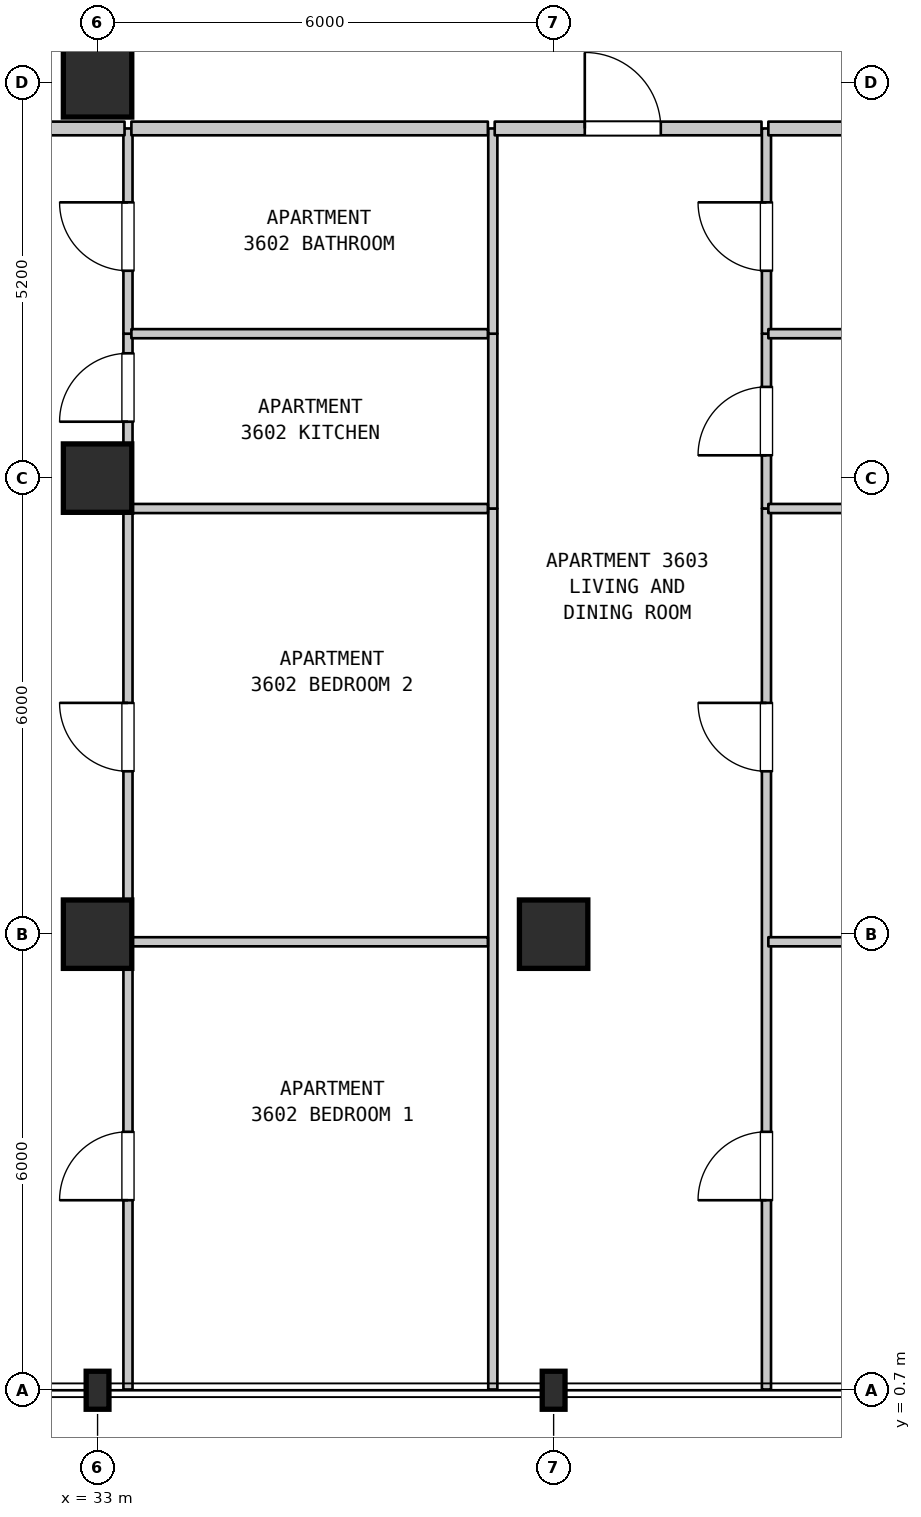
"""IFC4 building model, lengths in metres.
Left out: names, types, materials, properties, quantities, classifications, styles, units other than length and angle.
Written with IfcOpenShell. Run it as: python <this file> out.ifc"""

import sys

from ifc_helpers import new_model, si_unit, direction, frame, frame_2d, origin, origin_2d, place, context, subcontext, project, spatial, rectangle, i_section, extrude, element, fill, save


model = new_model("IFC4")
c1 = context("Model", 3, precision=1e-05, world=origin(), true_north=direction((0.0, 1.0)))
c2 = subcontext(c1, "Body", "Model", "MODEL_VIEW")
j1 = project(units=[si_unit("LENGTHUNIT", "METRE"), si_unit("PLANEANGLEUNIT", "RADIAN")], contexts=[c1])
p1 = place(None, origin())
s1 = spatial("IfcSite", under=j1, at=p1, CompositionType="ELEMENT")
p2 = place(p1, origin())
s2 = spatial("IfcBuilding", under=s1, at=p2, CompositionType="ELEMENT")
p3 = place(p2, frame((0.0, 0.0, 148.3)))
s3 = spatial("IfcBuildingStorey", under=s2, at=p3, CompositionType="ELEMENT", Elevation=148.3)
p4 = place(p3, frame((33.0, 0.7, 0.0), z_axis=(0.0, 0.0, 1.0), x_axis=(1.0, 0.0, 0.0)))
e1 = element("IfcColumn", 1, at=p4, inside=s3, PredefinedType="COLUMN", context=c2, shape_type="SweptSolid", body=[
    extrude(i_section(OverallWidth=0.3, OverallDepth=0.5, WebThickness=0.014, FlangeThickness=0.028, FilletRadius=0.027, at=origin_2d()), origin(), (0.0, 0.0, 1.0), 3.7),
])
for number, where, z_axis, x_axis in (
    (2, (33.0, 6.7, 0.0), (0.0, 0.0, 1.0), (1.0, 0.0, 0.0)),
    (3, (33.0, 12.7, 0.0), (0.0, 0.0, 1.0), (1.0, 0.0, 0.0)),
    (4, (33.0, 17.9, 0.0), (0.0, 0.0, 1.0), (1.0, 0.0, 0.0)),
):
    element("IfcColumn", number, at=place(p3, frame(where, z_axis=z_axis, x_axis=x_axis)), inside=s3, PredefinedType="COLUMN", context=c2, shape_type="SweptSolid", body=[
        extrude(rectangle(XDim=0.9, YDim=0.9, at=origin_2d()), origin(), (0.0, 0.0, 1.0), 3.7),
    ])
p5 = place(p3, frame((39.0, 0.7, 0.0), z_axis=(0.0, 0.0, 1.0), x_axis=(1.0, 0.0, 0.0)))
e5 = element("IfcColumn", 5, at=p5, inside=s3, PredefinedType="COLUMN", context=c2, shape_type="SweptSolid", body=[
    extrude(i_section(OverallWidth=0.3, OverallDepth=0.5, WebThickness=0.014, FlangeThickness=0.028, FilletRadius=0.027, at=origin_2d()), origin(), (0.0, 0.0, 1.0), 3.7),
])
p6 = place(p3, frame((39.0, 6.7, 0.0), z_axis=(0.0, 0.0, 1.0), x_axis=(1.0, 0.0, 0.0)))
e6 = element("IfcColumn", 6, at=p6, inside=s3, PredefinedType="COLUMN", context=c2, shape_type="SweptSolid", body=[
    extrude(rectangle(XDim=0.9, YDim=0.9, at=origin_2d()), origin(), (0.0, 0.0, 1.0), 3.7),
])
p7 = place(p3, frame((33.4, 0.71, 0.0), z_axis=(0.0, 0.0, 1.0), x_axis=(0.0, 1.0, 0.0)))
e7 = element("IfcWall", 7, at=p7, inside=s3, PredefinedType="PARTITIONING", context=c2, shape_type="SweptSolid", body=[
    extrude(rectangle(XDim=11.59, YDim=0.12, at=frame_2d((5.795, 0.0))), origin(), (0.0, 0.0, 1.0), 3.385),
])
p8 = place(p7, frame((2.49, 0.0, 0.0)))
e8 = element("IfcOpeningElement", 8, at=p8, cuts=e7, PredefinedType="OPENING", context=c2, shape_type="SweptSolid", body=[
    extrude(rectangle(XDim=0.9, YDim=2.15, at=frame_2d((0.45, 1.075))), frame((0.0, 0.07, 0.0), z_axis=(0.0, -1.0, 0.0), x_axis=(1.0, 0.0, 0.0)), (0.0, 0.0, 1.0), 0.14),
])
p9 = place(p7, frame((8.133, 0.0, 0.0)))
e9 = element("IfcOpeningElement", 9, at=p9, cuts=e7, PredefinedType="OPENING", context=c2, shape_type="SweptSolid", body=[
    extrude(rectangle(XDim=0.9, YDim=2.15, at=frame_2d((0.45, 1.075))), frame((0.0, 0.07, 0.0), z_axis=(0.0, -1.0, 0.0), x_axis=(1.0, 0.0, 0.0)), (0.0, 0.0, 1.0), 0.14),
])
p10 = place(p3, frame((33.4, 12.3, 0.0), z_axis=(0.0, 0.0, 1.0), x_axis=(0.0, 1.0, 0.0)))
e10 = element("IfcWall", 10, at=p10, inside=s3, PredefinedType="PARTITIONING", context=c2, shape_type="SweptSolid", body=[
    extrude(rectangle(XDim=2.3, YDim=0.12, at=frame_2d((1.15, 0.0))), origin(), (0.0, 0.0, 1.0), 3.385),
])
p11 = place(p10, frame((1.142, 0.0, 0.0)))
e11 = element("IfcOpeningElement", 11, at=p11, cuts=e10, PredefinedType="OPENING", context=c2, shape_type="SweptSolid", body=[
    extrude(rectangle(XDim=0.9, YDim=2.15, at=frame_2d((0.45, 1.075))), frame((0.0, 0.07, 0.0), z_axis=(0.0, -1.0, 0.0), x_axis=(1.0, 0.0, 0.0)), (0.0, 0.0, 1.0), 0.14),
])
p12 = place(p3, frame((33.4, 14.6, 0.0), z_axis=(0.0, 0.0, 1.0), x_axis=(0.0, 1.0, 0.0)))
e12 = element("IfcWall", 12, at=p12, inside=s3, PredefinedType="PARTITIONING", context=c2, shape_type="SweptSolid", body=[
    extrude(rectangle(XDim=2.7, YDim=0.12, at=frame_2d((1.35, 0.0))), origin(), (0.0, 0.0, 1.0), 3.385),
])
p13 = place(p12, frame((0.828, 0.0, 0.0)))
e13 = element("IfcOpeningElement", 13, at=p13, cuts=e12, PredefinedType="OPENING", context=c2, shape_type="SweptSolid", body=[
    extrude(rectangle(XDim=0.9, YDim=2.1, at=frame_2d((0.45, 1.05))), frame((0.0, 0.07, 0.0), z_axis=(0.0, -1.0, 0.0), x_axis=(1.0, 0.0, 0.0)), (0.0, 0.0, 1.0), 0.14),
])
p14 = place(p3, frame((38.2, 0.71, 0.0), z_axis=(0.0, 0.0, 1.0), x_axis=(0.0, 1.0, 0.0)))
e14 = element("IfcWall", 14, at=p14, inside=s3, PredefinedType="PARTITIONING", context=c2, shape_type="SweptSolid", body=[
    extrude(rectangle(XDim=11.59, YDim=0.12, at=frame_2d((5.795, 0.0))), origin(), (0.0, 0.0, 1.0), 3.385),
])
p15 = place(p3, frame((38.2, 12.3, 0.0), z_axis=(0.0, 0.0, 1.0), x_axis=(0.0, 1.0, 0.0)))
e15 = element("IfcWall", 15, at=p15, inside=s3, PredefinedType="PARTITIONING", context=c2, shape_type="SweptSolid", body=[
    extrude(rectangle(XDim=2.3, YDim=0.12, at=frame_2d((1.15, 0.0))), origin(), (0.0, 0.0, 1.0), 3.385),
])
p16 = place(p3, frame((38.2, 14.6, 0.0), z_axis=(0.0, 0.0, 1.0), x_axis=(0.0, 1.0, 0.0)))
e16 = element("IfcWall", 16, at=p16, inside=s3, PredefinedType="PARTITIONING", context=c2, shape_type="SweptSolid", body=[
    extrude(rectangle(XDim=2.7, YDim=0.12, at=frame_2d((1.35, 0.0))), origin(), (0.0, 0.0, 1.0), 3.385),
])
p17 = place(p3, frame((41.8, 0.71, 0.0), z_axis=(0.0, 0.0, 1.0), x_axis=(0.0, 1.0, 0.0)))
e17 = element("IfcWall", 17, at=p17, inside=s3, PredefinedType="PARTITIONING", context=c2, shape_type="SweptSolid", body=[
    extrude(rectangle(XDim=11.59, YDim=0.12, at=frame_2d((5.795, 0.0))), origin(), (0.0, 0.0, 1.0), 3.385),
])
p18 = place(p17, frame((2.49, 0.0, 0.0)))
e18 = element("IfcOpeningElement", 18, at=p18, cuts=e17, PredefinedType="OPENING", context=c2, shape_type="SweptSolid", body=[
    extrude(rectangle(XDim=0.9, YDim=2.15, at=frame_2d((0.45, 1.075))), frame((0.0, 0.07, 0.0), z_axis=(0.0, -1.0, 0.0), x_axis=(1.0, 0.0, 0.0)), (0.0, 0.0, 1.0), 0.14),
])
p19 = place(p17, frame((8.133, 0.0, 0.0)))
e19 = element("IfcOpeningElement", 19, at=p19, cuts=e17, PredefinedType="OPENING", context=c2, shape_type="SweptSolid", body=[
    extrude(rectangle(XDim=0.9, YDim=2.15, at=frame_2d((0.45, 1.075))), frame((0.0, 0.07, 0.0), z_axis=(0.0, -1.0, 0.0), x_axis=(1.0, 0.0, 0.0)), (0.0, 0.0, 1.0), 0.14),
])
p20 = place(p3, frame((41.8, 12.3, 0.0), z_axis=(0.0, 0.0, 1.0), x_axis=(0.0, 1.0, 0.0)))
e20 = element("IfcWall", 20, at=p20, inside=s3, PredefinedType="PARTITIONING", context=c2, shape_type="SweptSolid", body=[
    extrude(rectangle(XDim=2.3, YDim=0.12, at=frame_2d((1.15, 0.0))), origin(), (0.0, 0.0, 1.0), 3.385),
])
p21 = place(p20, frame((0.7, 0.0, 0.0)))
e21 = element("IfcOpeningElement", 21, at=p21, cuts=e20, PredefinedType="OPENING", context=c2, shape_type="SweptSolid", body=[
    extrude(rectangle(XDim=0.9, YDim=2.15, at=frame_2d((0.45, 1.075))), frame((0.0, 0.07, 0.0), z_axis=(0.0, -1.0, 0.0), x_axis=(1.0, 0.0, 0.0)), (0.0, 0.0, 1.0), 0.14),
])
p22 = place(p3, frame((41.8, 14.6, 0.0), z_axis=(0.0, 0.0, 1.0), x_axis=(0.0, 1.0, 0.0)))
e22 = element("IfcWall", 22, at=p22, inside=s3, PredefinedType="PARTITIONING", context=c2, shape_type="SweptSolid", body=[
    extrude(rectangle(XDim=2.7, YDim=0.12, at=frame_2d((1.35, 0.0))), origin(), (0.0, 0.0, 1.0), 3.385),
])
p23 = place(p22, frame((0.828, 0.0, 0.0)))
e23 = element("IfcOpeningElement", 23, at=p23, cuts=e22, PredefinedType="OPENING", context=c2, shape_type="SweptSolid", body=[
    extrude(rectangle(XDim=0.9, YDim=2.1, at=frame_2d((0.45, 1.05))), frame((0.0, 0.07, 0.0), z_axis=(0.0, -1.0, 0.0), x_axis=(1.0, 0.0, 0.0)), (0.0, 0.0, 1.0), 0.14),
])
p24 = place(p3, frame((33.445, 6.6, 0.0), z_axis=(0.0, 0.0, 1.0), x_axis=(1.0, 0.0, 0.0)))
e24 = element("IfcWall", 24, at=p24, inside=s3, PredefinedType="PARTITIONING", context=c2, shape_type="SweptSolid", body=[
    extrude(rectangle(XDim=4.69, YDim=0.12, at=frame_2d((2.345, 0.0))), origin(), (0.0, 0.0, 1.0), 2.935),
])
p25 = place(p3, frame((41.825, 6.6, 0.0), z_axis=(0.0, 0.0, 1.0), x_axis=(1.0, 0.0, 0.0)))
e25 = element("IfcWall", 25, at=p25, inside=s3, PredefinedType="PARTITIONING", context=c2, shape_type="SweptSolid", body=[
    extrude(rectangle(XDim=4.97, YDim=0.12, at=frame_2d((2.485, 0.0))), origin(), (0.0, 0.0, 1.0), 2.785),
])
p26 = place(p3, frame((33.445, 12.3, 0.0), z_axis=(0.0, 0.0, 1.0), x_axis=(1.0, 0.0, 0.0)))
e26 = element("IfcWall", 26, at=p26, inside=s3, PredefinedType="PARTITIONING", context=c2, shape_type="SweptSolid", body=[
    extrude(rectangle(XDim=4.69, YDim=0.12, at=frame_2d((2.345, 0.0))), origin(), (0.0, 0.0, 1.0), 3.385),
])
p27 = place(p3, frame((41.825, 12.3, 0.0), z_axis=(0.0, 0.0, 1.0), x_axis=(1.0, 0.0, 0.0)))
e27 = element("IfcWall", 27, at=p27, inside=s3, PredefinedType="PARTITIONING", context=c2, shape_type="SweptSolid", body=[
    extrude(rectangle(XDim=4.97, YDim=0.12, at=frame_2d((2.485, 0.0))), origin(), (0.0, 0.0, 1.0), 3.385),
])
p28 = place(p3, frame((33.445, 14.6, 0.0), z_axis=(0.0, 0.0, 1.0), x_axis=(1.0, 0.0, 0.0)))
e28 = element("IfcWall", 28, at=p28, inside=s3, PredefinedType="PARTITIONING", context=c2, shape_type="SweptSolid", body=[
    extrude(rectangle(XDim=4.69, YDim=0.12, at=frame_2d((2.345, 0.0))), origin(), (0.0, 0.0, 1.0), 3.385),
])
p29 = place(p3, frame((41.825, 14.6, 0.0), z_axis=(0.0, 0.0, 1.0), x_axis=(1.0, 0.0, 0.0)))
e29 = element("IfcWall", 29, at=p29, inside=s3, PredefinedType="PARTITIONING", context=c2, shape_type="SweptSolid", body=[
    extrude(rectangle(XDim=4.97, YDim=0.12, at=frame_2d((2.485, 0.0))), origin(), (0.0, 0.0, 1.0), 3.385),
])
p30 = place(p3, frame((29.845, 17.3, 0.0), z_axis=(0.0, 0.0, 1.0), x_axis=(1.0, 0.0, 0.0)))
e30 = element("IfcWall", 30, at=p30, inside=s3, PredefinedType="STANDARD", context=c2, shape_type="SweptSolid", body=[
    extrude(rectangle(XDim=3.51, YDim=0.18, at=frame_2d((1.755, 0.0))), origin(), (0.0, 0.0, 1.0), 3.385),
])
p31 = place(p30, frame((1.255, 0.0, 0.0)))
e31 = element("IfcOpeningElement", 31, at=p31, cuts=e30, PredefinedType="OPENING", context=c2, shape_type="SweptSolid", body=[
    extrude(rectangle(XDim=1.0, YDim=2.15, at=frame_2d((0.5, 1.075))), frame((0.0, 0.1, 0.0), z_axis=(0.0, -1.0, 0.0), x_axis=(1.0, 0.0, 0.0)), (0.0, 0.0, 1.0), 0.2),
])
p32 = place(p3, frame((33.445, 17.3, 0.0), z_axis=(0.0, 0.0, 1.0), x_axis=(1.0, 0.0, 0.0)))
e32 = element("IfcWall", 32, at=p32, inside=s3, PredefinedType="STANDARD", context=c2, shape_type="SweptSolid", body=[
    extrude(rectangle(XDim=4.69, YDim=0.18, at=frame_2d((2.345, 0.0))), origin(), (0.0, 0.0, 1.0), 3.385),
])
p33 = place(p3, frame((38.225, 17.3, 0.0), z_axis=(0.0, 0.0, 1.0), x_axis=(1.0, 0.0, 0.0)))
e33 = element("IfcWall", 33, at=p33, inside=s3, PredefinedType="STANDARD", context=c2, shape_type="SweptSolid", body=[
    extrude(rectangle(XDim=3.51, YDim=0.18, at=frame_2d((1.755, 0.0))), origin(), (0.0, 0.0, 1.0), 3.385),
])
p34 = place(p33, frame((1.185, 0.0, 0.0)))
e34 = element("IfcOpeningElement", 34, at=p34, cuts=e33, PredefinedType="OPENING", context=c2, shape_type="SweptSolid", body=[
    extrude(rectangle(XDim=1.0, YDim=2.15, at=frame_2d((0.5, 1.075))), frame((0.0, 0.1, 0.0), z_axis=(0.0, -1.0, 0.0), x_axis=(1.0, 0.0, 0.0)), (0.0, 0.0, 1.0), 0.2),
])
p35 = place(p3, frame((41.825, 17.3, 0.0), z_axis=(0.0, 0.0, 1.0), x_axis=(1.0, 0.0, 0.0)))
e35 = element("IfcWall", 35, at=p35, inside=s3, PredefinedType="STANDARD", context=c2, shape_type="SweptSolid", body=[
    extrude(rectangle(XDim=4.97, YDim=0.18, at=frame_2d((2.485, 0.0))), origin(), (0.0, 0.0, 1.0), 3.385),
])
p36 = place(p8, origin())
e36 = element("IfcDoor", 36, at=p36, inside=s3, OperationType="SINGLE_SWING_LEFT", PredefinedType="DOOR", context=c2, shape_type="SweptSolid", body=[
    extrude(rectangle(XDim=0.9, YDim=2.15, at=frame_2d((0.45, 1.075))), frame((0.0, 0.025, 0.0), z_axis=(0.0, -1.0, 0.0), x_axis=(1.0, 0.0, 0.0)), (0.0, 0.0, 1.0), 0.05),
])
fill(e8, e36)
p37 = place(p9, origin())
e37 = element("IfcDoor", 37, at=p37, inside=s3, OperationType="SINGLE_SWING_RIGHT", PredefinedType="DOOR", context=c2, shape_type="SweptSolid", body=[
    extrude(rectangle(XDim=0.9, YDim=2.15, at=frame_2d((0.45, 1.075))), frame((0.0, 0.025, 0.0), z_axis=(0.0, -1.0, 0.0), x_axis=(1.0, 0.0, 0.0)), (0.0, 0.0, 1.0), 0.05),
])
fill(e9, e37)
p38 = place(p11, origin())
e38 = element("IfcDoor", 38, at=p38, inside=s3, OperationType="SINGLE_SWING_LEFT", PredefinedType="DOOR", context=c2, shape_type="SweptSolid", body=[
    extrude(rectangle(XDim=0.9, YDim=2.15, at=frame_2d((0.45, 1.075))), frame((0.0, 0.025, 0.0), z_axis=(0.0, -1.0, 0.0), x_axis=(1.0, 0.0, 0.0)), (0.0, 0.0, 1.0), 0.05),
])
fill(e11, e38)
p39 = place(p13, origin())
e39 = element("IfcDoor", 39, at=p39, inside=s3, OperationType="SINGLE_SWING_RIGHT", PredefinedType="DOOR", context=c2, shape_type="SweptSolid", body=[
    extrude(rectangle(XDim=0.9, YDim=2.1, at=frame_2d((0.45, 1.05))), frame((0.0, 0.025, 0.0), z_axis=(0.0, -1.0, 0.0), x_axis=(1.0, 0.0, 0.0)), (0.0, 0.0, 1.0), 0.05),
])
fill(e13, e39)
p40 = place(p18, origin())
e40 = element("IfcDoor", 40, at=p40, inside=s3, OperationType="SINGLE_SWING_LEFT", PredefinedType="DOOR", context=c2, shape_type="SweptSolid", body=[
    extrude(rectangle(XDim=0.9, YDim=2.15, at=frame_2d((0.45, 1.075))), frame((0.0, 0.025, 0.0), z_axis=(0.0, -1.0, 0.0), x_axis=(1.0, 0.0, 0.0)), (0.0, 0.0, 1.0), 0.05),
])
fill(e18, e40)
p41 = place(p19, origin())
e41 = element("IfcDoor", 41, at=p41, inside=s3, OperationType="SINGLE_SWING_RIGHT", PredefinedType="DOOR", context=c2, shape_type="SweptSolid", body=[
    extrude(rectangle(XDim=0.9, YDim=2.15, at=frame_2d((0.45, 1.075))), frame((0.0, 0.025, 0.0), z_axis=(0.0, -1.0, 0.0), x_axis=(1.0, 0.0, 0.0)), (0.0, 0.0, 1.0), 0.05),
])
fill(e19, e41)
p42 = place(p21, origin())
e42 = element("IfcDoor", 42, at=p42, inside=s3, OperationType="SINGLE_SWING_LEFT", PredefinedType="DOOR", context=c2, shape_type="SweptSolid", body=[
    extrude(rectangle(XDim=0.9, YDim=2.15, at=frame_2d((0.45, 1.075))), frame((0.0, 0.025, 0.0), z_axis=(0.0, -1.0, 0.0), x_axis=(1.0, 0.0, 0.0)), (0.0, 0.0, 1.0), 0.05),
])
fill(e21, e42)
p43 = place(p23, origin())
e43 = element("IfcDoor", 43, at=p43, inside=s3, OperationType="SINGLE_SWING_RIGHT", PredefinedType="DOOR", context=c2, shape_type="SweptSolid", body=[
    extrude(rectangle(XDim=0.9, YDim=2.1, at=frame_2d((0.45, 1.05))), frame((0.0, 0.025, 0.0), z_axis=(0.0, -1.0, 0.0), x_axis=(1.0, 0.0, 0.0)), (0.0, 0.0, 1.0), 0.05),
])
fill(e23, e43)
p44 = place(p34, origin())
e44 = element("IfcDoor", 44, at=p44, inside=s3, OperationType="SINGLE_SWING_LEFT", PredefinedType="DOOR", context=c2, shape_type="SweptSolid", body=[
    extrude(rectangle(XDim=1.0, YDim=2.15, at=frame_2d((0.5, 1.075))), frame((0.0, 0.025, 0.0), z_axis=(0.0, -1.0, 0.0), x_axis=(1.0, 0.0, 0.0)), (0.0, 0.0, 1.0), 0.05),
])
fill(e34, e44)
save(model, sys.argv[1])
